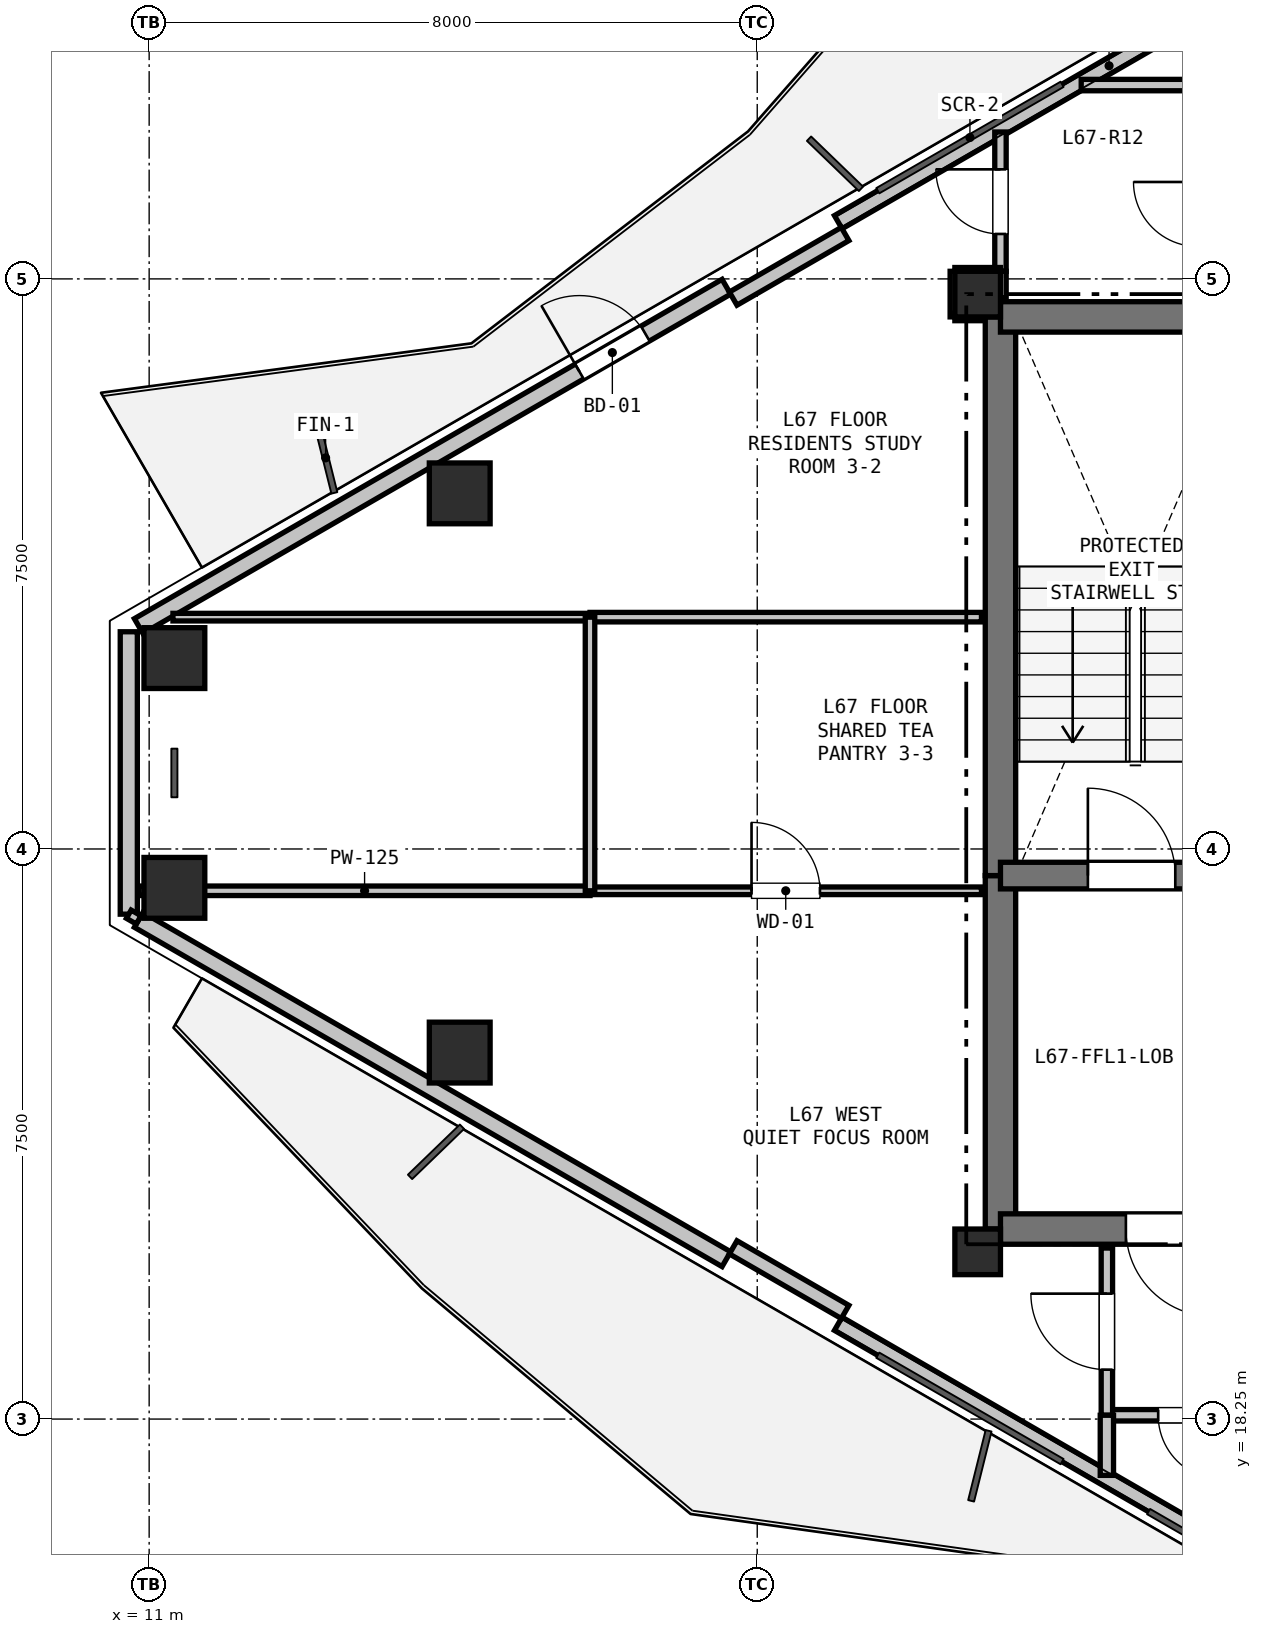
"""IFC4 building model, lengths in metres.
Left out: names, types, materials, properties, quantities, classifications, styles, units other than length and angle.
Written with IfcOpenShell. Run it as: python <this file> out.ifc"""

import sys

from ifc_helpers import new_model, si_unit, direction, frame, frame_2d, origin, origin_2d, place, context, subcontext, project, spatial, rectangle, hollow_rectangle, extrude, element, fill, save


model = new_model("IFC4")
c1 = context("Model", 3, precision=1e-05, world=origin(), true_north=direction((0.0, 1.0)))
c2 = subcontext(c1, "Body", "Model", "MODEL_VIEW")
j1 = project(units=[si_unit("LENGTHUNIT", "METRE"), si_unit("PLANEANGLEUNIT", "RADIAN")], contexts=[c1])
p1 = place(None, origin())
s1 = spatial("IfcSite", under=j1, at=p1, CompositionType="ELEMENT")
p2 = place(p1, origin())
s2 = spatial("IfcBuilding", under=s1, at=p2, CompositionType="ELEMENT")
p3 = place(p2, frame((0.0, 0.0, 239.7)))
s3 = spatial("IfcBuildingStorey", under=s2, at=p3, CompositionType="ELEMENT", Elevation=239.7)
for number, where, z_axis, x_axis in (
    (1, (21.9, 20.45, 0.0), (0.0, 0.0, 1.0), (1.0, 0.0, 0.0)),
    (2, (21.9, 33.05, 0.0), (0.0, 0.0, 1.0), (1.0, 0.0, 0.0)),
):
    element("IfcColumn", number, at=place(p3, frame(where, z_axis=z_axis, x_axis=x_axis)), inside=s3, PredefinedType="COLUMN", context=c2, shape_type="SweptSolid", body=[
        extrude(rectangle(XDim=0.6, YDim=0.6, at=origin_2d()), origin(), (0.0, 0.0, 1.0), 3.3),
    ])
for number, where, z_axis, x_axis in (
    (3, (11.332, 28.261, 0.0), (0.0, 0.0, 1.0), (1.0, 0.0, 0.0)),
    (4, (15.086, 30.428, 0.0), (0.0, 0.0, 1.0), (1.0, 0.0, 0.0)),
    (5, (15.086, 23.072, 0.0), (0.0, 0.0, 1.0), (1.0, 0.0, 0.0)),
    (6, (11.332, 25.239, 0.0), (0.0, 0.0, 1.0), (1.0, 0.0, 0.0)),
):
    element("IfcColumn", number, at=place(p3, frame(where, z_axis=z_axis, x_axis=x_axis)), inside=s3, PredefinedType="COLUMN", context=c2, shape_type="SweptSolid", body=[
        extrude(hollow_rectangle(XDim=0.8, YDim=0.8, WallThickness=0.025, at=origin_2d()), origin(), (0.0, 0.0, 1.0), 3.3),
    ])
p4 = place(p3, frame((10.732, 24.892, 0.0), z_axis=(0.0, 0.0, 1.0), x_axis=(0.0, 1.0, 0.0)))
e7 = element("IfcWall", 7, at=p4, inside=s3, PredefinedType="SOLIDWALL", context=c2, shape_type="SweptSolid", body=[
    extrude(rectangle(XDim=3.715, YDim=0.225, at=frame_2d((1.858, 0.0))), origin(), (0.0, 0.0, 1.0), 2.7),
])
p5 = place(p3, frame((10.862, 28.683, 0.0), z_axis=(0.0, 0.0, 1.0), x_axis=(0.866026655105, 0.499997832642, 0.0)))
e8 = element("IfcWall", 8, at=p5, inside=s3, PredefinedType="SOLIDWALL", context=c2, shape_type="SweptSolid", body=[
    extrude(rectangle(XDim=8.928, YDim=0.225, at=frame_2d((4.464, 0.0))), origin(), (0.0, 0.0, 1.0), 2.7),
])
p6 = place(p5, frame((6.696, 0.0, 0.0)))
e9 = element("IfcOpeningElement", 9, at=p6, cuts=e8, PredefinedType="OPENING", context=c2, shape_type="SweptSolid", body=[
    extrude(rectangle(XDim=1.0, YDim=2.1, at=frame_2d((0.5, 1.05))), frame((0.0, 0.123, 0.0), z_axis=(0.0, -1.0, 0.0), x_axis=(1.0, 0.0, 0.0)), (0.0, 0.0, 1.0), 0.245),
])
p7 = place(p3, frame((20.066, 33.997, 0.0), z_axis=(0.0, 0.0, 1.0), x_axis=(0.866019557082, 0.500010126649, 0.0)))
e10 = element("IfcWall", 10, at=p7, inside=s3, PredefinedType="PARAPET", context=c2, shape_type="SweptSolid", body=[
    extrude(rectangle(XDim=8.228, YDim=0.2, at=frame_2d((4.114, 0.0))), origin(), (0.0, 0.0, 1.0), 0.2),
])
p8 = place(p3, frame((18.684, 32.991, 0.0), z_axis=(0.0, 0.0, 1.0), x_axis=(0.866025371046, 0.500000056704, 0.0)))
e11 = element("IfcWall", 11, at=p8, inside=s3, PredefinedType="PARAPET", context=c2, shape_type="SweptSolid", body=[
    extrude(rectangle(XDim=1.7, YDim=0.2, at=frame_2d((0.85, 0.0))), origin(), (0.0, 0.0, 1.0), 2.7),
])
p9 = place(p3, frame((27.191, 15.389, 0.0), z_axis=(0.0, 0.0, 1.0), x_axis=(-0.866019557082, 0.500010126649, 0.0)))
e12 = element("IfcWall", 12, at=p9, inside=s3, PredefinedType="PARAPET", context=c2, shape_type="SweptSolid", body=[
    extrude(rectangle(XDim=8.228, YDim=0.2, at=frame_2d((4.114, 0.0))), origin(), (0.0, 0.0, 1.0), 0.2),
])
p10 = place(p3, frame((18.594, 20.354, 0.0), z_axis=(0.0, 0.0, 1.0), x_axis=(-0.866026655105, 0.499997832642, 0.0)))
e13 = element("IfcWall", 13, at=p10, inside=s3, PredefinedType="SOLIDWALL", context=c2, shape_type="SweptSolid", body=[
    extrude(rectangle(XDim=8.928, YDim=0.225, at=frame_2d((4.464, 0.0))), origin(), (0.0, 0.0, 1.0), 2.7),
])
p11 = place(p3, frame((20.156, 19.659, 0.0), z_axis=(0.0, 0.0, 1.0), x_axis=(-0.866025371046, 0.500000056704, 0.0)))
e14 = element("IfcWall", 14, at=p11, inside=s3, PredefinedType="PARAPET", context=c2, shape_type="SweptSolid", body=[
    extrude(rectangle(XDim=1.7, YDim=0.2, at=frame_2d((0.85, 0.0))), origin(), (0.0, 0.0, 1.0), 2.7),
])
p12 = place(p3, frame((22.2, 20.75, 0.0), z_axis=(0.0, 0.0, 1.0), x_axis=(0.0, 1.0, 0.0)))
e15 = element("IfcWall", 15, at=p12, inside=s3, PredefinedType="SHEAR", context=c2, shape_type="SweptSolid", body=[
    extrude(rectangle(XDim=4.65, YDim=0.4, at=frame_2d((2.325, 0.0))), origin(), (0.0, 0.0, 1.0), 3.08),
])
p13 = place(p3, frame((22.2, 25.4, 0.0), z_axis=(0.0, 0.0, 1.0), x_axis=(0.0, 1.0, 0.0)))
e16 = element("IfcWall", 16, at=p13, inside=s3, PredefinedType="SHEAR", context=c2, shape_type="SweptSolid", body=[
    extrude(rectangle(XDim=7.35, YDim=0.4, at=frame_2d((3.675, 0.0))), origin(), (0.0, 0.0, 1.0), 3.08),
])
p14 = place(p3, frame((22.2, 32.75, 0.0), z_axis=(0.0, 0.0, 1.0), x_axis=(1.0, 0.0, 0.0)))
e17 = element("IfcWall", 17, at=p14, inside=s3, PredefinedType="SHEAR", context=c2, shape_type="SweptSolid", body=[
    extrude(rectangle(XDim=3.45, YDim=0.4, at=frame_2d((1.725, 0.0))), origin(), (0.0, 0.0, 1.0), 3.08),
])
p15 = place(p3, frame((25.65, 20.75, 0.0), z_axis=(0.0, 0.0, 1.0), x_axis=(-1.0, 0.0, 0.0)))
e18 = element("IfcWall", 18, at=p15, inside=s3, PredefinedType="SHEAR", context=c2, shape_type="SweptSolid", body=[
    extrude(rectangle(XDim=3.45, YDim=0.4, at=frame_2d((1.725, 0.0))), origin(), (0.0, 0.0, 1.0), 3.08),
])
p16 = place(p15, frame((0.65, 0.0, 0.0)))
e19 = element("IfcOpeningElement", 19, at=p16, cuts=e18, PredefinedType="OPENING", context=c2, shape_type="SweptSolid", body=[
    extrude(rectangle(XDim=1.15, YDim=2.15, at=frame_2d((0.575, 1.075))), frame((0.0, 0.21, 0.0), z_axis=(0.0, -1.0, 0.0), x_axis=(1.0, 0.0, 0.0)), (0.0, 0.0, 1.0), 0.42),
])
p17 = place(p3, frame((22.2, 25.4, 0.0), z_axis=(0.0, 0.0, 1.0), x_axis=(1.0, 0.0, 0.0)))
e20 = element("IfcWall", 20, at=p17, inside=s3, PredefinedType="SHEAR", context=c2, shape_type="SweptSolid", body=[
    extrude(rectangle(XDim=3.45, YDim=0.35, at=frame_2d((1.725, 0.0))), origin(), (0.0, 0.0, 1.0), 3.08),
])
p18 = place(p17, frame((1.15, 0.0, 0.0)))
e21 = element("IfcOpeningElement", 21, at=p18, cuts=e20, PredefinedType="OPENING", context=c2, shape_type="SweptSolid", body=[
    extrude(rectangle(XDim=1.15, YDim=2.15, at=frame_2d((0.575, 1.075))), frame((0.0, 0.185, 0.0), z_axis=(0.0, -1.0, 0.0), x_axis=(1.0, 0.0, 0.0)), (0.0, 0.0, 1.0), 0.37),
])
p19 = place(p3, frame((25.8, 18.3, 0.0), z_axis=(0.0, 0.0, 1.0), x_axis=(-1.0, 0.0, 0.0)))
e22 = element("IfcWall", 22, at=p19, inside=s3, PredefinedType="PARTITIONING", context=c2, shape_type="SweptSolid", body=[
    extrude(rectangle(XDim=2.2, YDim=0.15, at=frame_2d((1.1, 0.0))), origin(), (0.0, 0.0, 1.0), 2.365),
])
p20 = place(p19, frame((0.675, 0.0, 0.0)))
e23 = element("IfcOpeningElement", 23, at=p20, cuts=e22, PredefinedType="OPENING", context=c2, shape_type="SweptSolid", body=[
    extrude(rectangle(XDim=0.85, YDim=2.1, at=frame_2d((0.425, 1.05))), frame((0.0, 0.085, 0.0), z_axis=(0.0, -1.0, 0.0), x_axis=(1.0, 0.0, 0.0)), (0.0, 0.0, 1.0), 0.17),
])
p21 = place(p3, frame((23.6, 18.3, 0.0), z_axis=(0.0, 0.0, 1.0), x_axis=(0.0, 1.0, 0.0)))
e24 = element("IfcWall", 24, at=p21, inside=s3, PredefinedType="PARTITIONING", context=c2, shape_type="SweptSolid", body=[
    extrude(rectangle(XDim=2.2, YDim=0.15, at=frame_2d((1.1, 0.0))), origin(), (0.0, 0.0, 1.0), 2.528),
])
p22 = place(p21, frame((0.6, 0.0, 0.0)))
e25 = element("IfcOpeningElement", 25, at=p22, cuts=e24, PredefinedType="OPENING", context=c2, shape_type="SweptSolid", body=[
    extrude(rectangle(XDim=1.0, YDim=2.15, at=frame_2d((0.5, 1.075))), frame((0.0, 0.085, 0.0), z_axis=(0.0, -1.0, 0.0), x_axis=(1.0, 0.0, 0.0)), (0.0, 0.0, 1.0), 0.17),
])
p23 = place(p3, frame((23.6, 17.509, 0.0), z_axis=(0.0, 0.0, 1.0), x_axis=(0.0, 1.0, 0.0)))
e26 = element("IfcWall", 26, at=p23, inside=s3, PredefinedType="PLUMBINGWALL", context=c2, shape_type="SweptSolid", body=[
    extrude(rectangle(XDim=0.791, YDim=0.175, at=frame_2d((0.396, 0.0))), origin(), (0.0, 0.0, 1.0), 2.365),
])
p24 = place(p3, frame((10.868, 25.2, 0.0), z_axis=(0.0, 0.0, 1.0), x_axis=(1.0, 0.0, 0.0)))
e27 = element("IfcWall", 27, at=p24, inside=s3, PredefinedType="PARTITIONING", context=c2, shape_type="SweptSolid", body=[
    extrude(rectangle(XDim=5.932, YDim=0.125, at=frame_2d((2.966, 0.0))), origin(), (0.0, 0.0, 1.0), 2.528),
])
p25 = place(p3, frame((16.8, 25.2, 0.0), z_axis=(0.0, 0.0, 1.0), x_axis=(1.0, 0.0, 0.0)))
e28 = element("IfcWall", 28, at=p25, inside=s3, PredefinedType="PARTITIONING", context=c2, shape_type="SweptSolid", body=[
    extrude(rectangle(XDim=5.15, YDim=0.1, at=frame_2d((2.575, 0.0))), origin(), (0.0, 0.0, 1.0), 2.605),
])
p26 = place(p25, frame((2.125, 0.0, 0.0)))
e29 = element("IfcOpeningElement", 29, at=p26, cuts=e28, PredefinedType="OPENING", context=c2, shape_type="SweptSolid", body=[
    extrude(rectangle(XDim=0.9, YDim=2.1, at=frame_2d((0.45, 1.05))), frame((0.0, 0.06, 0.0), z_axis=(0.0, -1.0, 0.0), x_axis=(1.0, 0.0, 0.0)), (0.0, 0.0, 1.0), 0.12),
])
p27 = place(p3, frame((10.862, 24.817, 0.0), z_axis=(0.0, 0.0, 1.0), x_axis=(-0.866131372301, 0.499816412211, 0.0)))
e30 = element("IfcWall", 30, at=p27, inside=s3, PredefinedType="PARTITIONING", context=c2, shape_type="SweptSolid", body=[
    extrude(rectangle(XDim=0.15, YDim=0.125, at=frame_2d((0.075, 0.0))), origin(), (0.0, 0.0, 1.0), 3.08),
])
p28 = place(p3, frame((22.2, 33.0, 0.0), z_axis=(0.0, 0.0, 1.0), x_axis=(0.0, 1.0, 0.0)))
e31 = element("IfcWall", 31, at=p28, inside=s3, PredefinedType="PARTITIONING", context=c2, shape_type="SweptSolid", body=[
    extrude(rectangle(XDim=0.35, YDim=0.15, at=frame_2d((0.175, 0.0))), origin(), (0.0, 0.0, 1.0), 2.605),
])
p29 = place(p3, frame((22.2, 33.35, 0.0), z_axis=(0.0, 0.0, 1.0), x_axis=(0.0, 1.0, 0.0)))
e32 = element("IfcWall", 32, at=p29, inside=s3, PredefinedType="PARTITIONING", context=c2, shape_type="SweptSolid", body=[
    extrude(rectangle(XDim=1.833, YDim=0.15, at=frame_2d((0.916, 0.0))), origin(), (0.0, 0.0, 1.0), 2.365),
])
p30 = place(p29, frame((0.491, 0.0, 0.0)))
e33 = element("IfcOpeningElement", 33, at=p30, cuts=e32, PredefinedType="OPENING", context=c2, shape_type="SweptSolid", body=[
    extrude(rectangle(XDim=0.85, YDim=2.1, at=frame_2d((0.425, 1.05))), frame((0.0, 0.085, 0.0), z_axis=(0.0, -1.0, 0.0), x_axis=(1.0, 0.0, 0.0)), (0.0, 0.0, 1.0), 0.17),
])
p31 = place(p3, frame((23.262, 35.8, 0.0), z_axis=(0.0, 0.0, 1.0), x_axis=(1.0, 0.0, 0.0)))
e34 = element("IfcWall", 34, at=p31, inside=s3, PredefinedType="PARTITIONING", context=c2, shape_type="SweptSolid", body=[
    extrude(rectangle(XDim=1.538, YDim=0.15, at=frame_2d((0.769, 0.0))), origin(), (0.0, 0.0, 1.0), 2.365),
])
p32 = place(p3, frame((22.2, 33.35, 0.0), z_axis=(0.0, 0.0, 1.0), x_axis=(-1.0, 0.0, 0.0)))
e35 = element("IfcWall", 35, at=p32, inside=s3, PredefinedType="PARTITIONING", context=c2, shape_type="SweptSolid", body=[
    extrude(rectangle(XDim=0.6, YDim=0.1, at=frame_2d((0.3, 0.0))), origin(), (0.0, 0.0, 1.0), 3.08),
])
p33 = place(p3, frame((21.6, 33.35, 0.0), z_axis=(0.0, 0.0, 1.0), x_axis=(0.0, -1.0, 0.0)))
e36 = element("IfcWall", 36, at=p33, inside=s3, PredefinedType="PARTITIONING", context=c2, shape_type="SweptSolid", body=[
    extrude(rectangle(XDim=0.6, YDim=0.125, at=frame_2d((0.3, 0.0))), origin(), (0.0, 0.0, 1.0), 2.528),
])
p34 = place(p3, frame((21.6, 32.75, 0.0), z_axis=(0.0, 0.0, 1.0), x_axis=(1.0, 0.0, 0.0)))
e37 = element("IfcWall", 37, at=p34, inside=s3, PredefinedType="PARTITIONING", context=c2, shape_type="SweptSolid", body=[
    extrude(rectangle(XDim=0.35, YDim=0.1, at=frame_2d((0.175, 0.0))), origin(), (0.0, 0.0, 1.0), 2.605),
])
p35 = place(p3, frame((21.95, 28.8, 0.0), z_axis=(0.0, 0.0, 1.0), x_axis=(-1.0, 0.0, 0.0)))
e38 = element("IfcWall", 38, at=p35, inside=s3, PredefinedType="PARTITIONING", context=c2, shape_type="SweptSolid", body=[
    extrude(rectangle(XDim=5.15, YDim=0.125, at=frame_2d((2.575, 0.0))), origin(), (0.0, 0.0, 1.0), 2.605),
])
p36 = place(p3, frame((16.8, 28.8, 0.0), z_axis=(0.0, 0.0, 1.0), x_axis=(-1.0, 0.0, 0.0)))
e39 = element("IfcWall", 39, at=p36, inside=s3, PredefinedType="PARTITIONING", context=c2, shape_type="SweptSolid", body=[
    extrude(rectangle(XDim=5.487, YDim=0.1, at=frame_2d((2.743, 0.0))), origin(), (0.0, 0.0, 1.0), 2.805),
])
p37 = place(p3, frame((16.8, 25.2, 0.0), z_axis=(0.0, 0.0, 1.0), x_axis=(0.0, 1.0, 0.0)))
e40 = element("IfcWall", 40, at=p37, inside=s3, PredefinedType="PARTITIONING", context=c2, shape_type="SweptSolid", body=[
    extrude(rectangle(XDim=3.6, YDim=0.125, at=frame_2d((1.8, 0.0))), origin(), (0.0, 0.0, 1.0), 3.08),
])
p38 = place(p6, origin())
e41 = element("IfcDoor", 41, at=p38, inside=s3, OperationType="SINGLE_SWING_LEFT", PredefinedType="DOOR", context=c2, shape_type="SweptSolid", body=[
    extrude(rectangle(XDim=1.0, YDim=2.1, at=frame_2d((0.5, 1.05))), frame((0.0, 0.025, 0.0), z_axis=(0.0, -1.0, 0.0), x_axis=(1.0, 0.0, 0.0)), (0.0, 0.0, 1.0), 0.05),
])
fill(e9, e41)
p39 = place(p18, origin())
e42 = element("IfcDoor", 42, at=p39, inside=s3, OperationType="SINGLE_SWING_LEFT", PredefinedType="DOOR", context=c2, shape_type="SweptSolid", body=[
    extrude(rectangle(XDim=1.15, YDim=2.15, at=frame_2d((0.575, 1.075))), frame((0.0, 0.025, 0.0), z_axis=(0.0, -1.0, 0.0), x_axis=(1.0, 0.0, 0.0)), (0.0, 0.0, 1.0), 0.05),
])
fill(e21, e42)
p40 = place(p16, origin())
e43 = element("IfcDoor", 43, at=p40, inside=s3, OperationType="SINGLE_SWING_LEFT", PredefinedType="DOOR", context=c2, shape_type="SweptSolid", body=[
    extrude(rectangle(XDim=1.15, YDim=2.15, at=frame_2d((0.575, 1.075))), frame((0.0, 0.025, 0.0), z_axis=(0.0, -1.0, 0.0), x_axis=(1.0, 0.0, 0.0)), (0.0, 0.0, 1.0), 0.05),
])
fill(e19, e43)
p41 = place(p20, origin())
e44 = element("IfcDoor", 44, at=p41, inside=s3, OperationType="SINGLE_SWING_LEFT", PredefinedType="DOOR", context=c2, shape_type="SweptSolid", body=[
    extrude(rectangle(XDim=0.85, YDim=2.1, at=frame_2d((0.425, 1.05))), frame((0.0, 0.025, 0.0), z_axis=(0.0, -1.0, 0.0), x_axis=(1.0, 0.0, 0.0)), (0.0, 0.0, 1.0), 0.05),
])
fill(e23, e44)
p42 = place(p22, origin())
e45 = element("IfcDoor", 45, at=p42, inside=s3, OperationType="SINGLE_SWING_RIGHT", PredefinedType="DOOR", context=c2, shape_type="SweptSolid", body=[
    extrude(rectangle(XDim=1.0, YDim=2.15, at=frame_2d((0.5, 1.075))), frame((0.0, 0.025, 0.0), z_axis=(0.0, -1.0, 0.0), x_axis=(1.0, 0.0, 0.0)), (0.0, 0.0, 1.0), 0.05),
])
fill(e25, e45)
p43 = place(p30, origin())
e46 = element("IfcDoor", 46, at=p43, inside=s3, OperationType="SINGLE_SWING_RIGHT", PredefinedType="DOOR", context=c2, shape_type="SweptSolid", body=[
    extrude(rectangle(XDim=0.85, YDim=2.1, at=frame_2d((0.425, 1.05))), frame((0.0, 0.025, 0.0), z_axis=(0.0, -1.0, 0.0), x_axis=(1.0, 0.0, 0.0)), (0.0, 0.0, 1.0), 0.05),
])
fill(e33, e46)
p44 = place(p26, origin())
e47 = element("IfcDoor", 47, at=p44, inside=s3, OperationType="SINGLE_SWING_LEFT", PredefinedType="DOOR", context=c2, shape_type="SweptSolid", body=[
    extrude(rectangle(XDim=0.9, YDim=2.1, at=frame_2d((0.45, 1.05))), frame((0.0, 0.025, 0.0), z_axis=(0.0, -1.0, 0.0), x_axis=(1.0, 0.0, 0.0)), (0.0, 0.0, 1.0), 0.05),
])
fill(e29, e47)
save(model, sys.argv[1])
